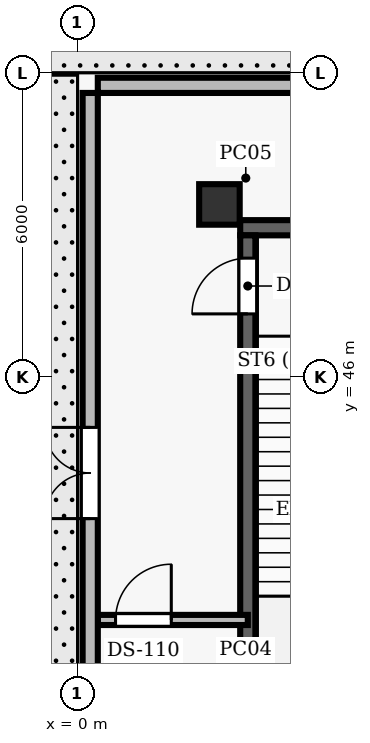
"""IFC4 building model, lengths in metres.
Left out: names, types, materials, properties, quantities, classifications, styles, units other than length and angle.
Written with IfcOpenShell. Run it as: python <this file> out.ifc"""

import sys

from ifc_helpers import new_model, si_unit, direction, frame, frame_2d, origin, origin_2d, place, context, subcontext, project, spatial, rectangle, extrude, element, fill, save


model = new_model("IFC4")
c1 = context("Model", 3, precision=1e-05, world=origin(), true_north=direction((0.0, 1.0)))
c2 = subcontext(c1, "Body", "Model", "MODEL_VIEW")
j1 = project(units=[si_unit("LENGTHUNIT", "METRE"), si_unit("PLANEANGLEUNIT", "RADIAN")], contexts=[c1])
p1 = place(None, origin())
s1 = spatial("IfcSite", under=j1, at=p1, CompositionType="ELEMENT")
p2 = place(p1, origin())
s2 = spatial("IfcBuilding", under=s1, at=p2, CompositionType="ELEMENT")
p3 = place(p2, origin())
s3 = spatial("IfcBuildingStorey", under=s2, at=p3, CompositionType="ELEMENT", Elevation=0.0)
p4 = place(p3, frame((2.8, 49.4, 0.0), z_axis=(0.0, 0.0, 1.0), x_axis=(1.0, 0.0, 0.0)))
e1 = element("IfcColumn", 1, at=p4, inside=s3, PredefinedType="COLUMN", context=c2, shape_type="SweptSolid", body=[
    extrude(rectangle(XDim=0.8, YDim=0.8, at=origin_2d()), origin(), (0.0, 0.0, 1.0), 6.6),
])
p5 = place(p3, frame((3.21, 48.94, 0.0), z_axis=(0.0, 0.0, 1.0), x_axis=(1.0, 0.0, 0.0)))
e2 = element("IfcWall", 2, at=p5, inside=s3, PredefinedType="SHEAR", context=c2, shape_type="SweptSolid", body=[
    extrude(rectangle(XDim=4.56, YDim=0.3, at=frame_2d((2.28, 0.0))), origin(), (0.0, 0.0, 1.0), 6.6),
])
p6 = place(p3, frame((3.36, 39.66, 0.0), z_axis=(0.0, 0.0, 1.0), x_axis=(0.0, 1.0, 0.0)))
e3 = element("IfcWall", 3, at=p6, inside=s3, PredefinedType="SHEAR", context=c2, shape_type="SweptSolid", body=[
    extrude(rectangle(XDim=9.13, YDim=0.3, at=frame_2d((4.565, 0.0))), origin(), (0.0, 0.0, 1.0), 6.6),
])
p7 = place(p6, frame((7.58, 0.0, 0.0)))
e4 = element("IfcOpeningElement", 4, at=p7, cuts=e3, PredefinedType="OPENING", context=c2, shape_type="SweptSolid", body=[
    extrude(rectangle(XDim=1.1, YDim=2.15, at=frame_2d((0.55, 1.075))), frame((0.0, 0.16, 0.0), z_axis=(0.0, -1.0, 0.0), x_axis=(1.0, 0.0, 0.0)), (0.0, 0.0, 1.0), 0.32),
])
p8 = place(p3, frame((0.4, 41.2, 0.0), z_axis=(0.0, 0.0, 1.0), x_axis=(1.0, 0.0, 0.0)))
e5 = element("IfcWall", 5, at=p8, inside=s3, PredefinedType="PARTITIONING", context=c2, shape_type="SweptSolid", body=[
    extrude(rectangle(XDim=2.96, YDim=0.2, at=frame_2d((1.48, 0.0))), origin(), (0.0, 0.0, 1.0), 5.31),
])
p9 = place(p8, frame((0.35, 0.0, 0.0)))
e6 = element("IfcOpeningElement", 6, at=p9, cuts=e5, PredefinedType="OPENING", context=c2, shape_type="SweptSolid", body=[
    extrude(rectangle(XDim=1.1, YDim=2.15, at=frame_2d((0.55, 1.075))), frame((0.0, 0.11, 0.0), z_axis=(0.0, -1.0, 0.0), x_axis=(1.0, 0.0, 0.0)), (0.0, 0.0, 1.0), 0.22),
])
p10 = place(p3, frame((0.25, 0.4, 0.0), z_axis=(0.0, 0.0, 1.0), x_axis=(0.0, 1.0, 0.0)))
e7 = element("IfcWall", 7, at=p10, inside=s3, PredefinedType="SOLIDWALL", context=c2, shape_type="SweptSolid", body=[
    extrude(rectangle(XDim=51.2, YDim=0.3, at=frame_2d((25.6, 0.0))), origin(), (0.0, 0.0, 1.0), 5.76),
])
p11 = place(p10, frame((14.0, 0.0, 0.0)))
e8 = element("IfcOpeningElement", 8, at=p11, cuts=e7, PredefinedType="OPENING", context=c2, shape_type="SweptSolid", body=[
    extrude(rectangle(XDim=1.8, YDim=2.3, at=frame_2d((0.9, 1.15))), frame((0.0, 0.16, 0.0), z_axis=(0.0, -1.0, 0.0), x_axis=(1.0, 0.0, 0.0)), (0.0, 0.0, 1.0), 0.32),
])
p12 = place(p10, frame((19.6, 0.0, 0.0)))
e9 = element("IfcOpeningElement", 9, at=p12, cuts=e7, PredefinedType="OPENING", context=c2, shape_type="SweptSolid", body=[
    extrude(rectangle(XDim=1.8, YDim=2.3, at=frame_2d((0.9, 1.15))), frame((0.0, 0.16, 0.0), z_axis=(0.0, -1.0, 0.0), x_axis=(1.0, 0.0, 0.0)), (0.0, 0.0, 1.0), 0.32),
])
p13 = place(p10, frame((29.2, 0.0, 0.0)))
e10 = element("IfcOpeningElement", 10, at=p13, cuts=e7, PredefinedType="OPENING", context=c2, shape_type="SweptSolid", body=[
    extrude(rectangle(XDim=1.8, YDim=2.3, at=frame_2d((0.9, 1.15))), frame((0.0, 0.16, 0.0), z_axis=(0.0, -1.0, 0.0), x_axis=(1.0, 0.0, 0.0)), (0.0, 0.0, 1.0), 0.32),
])
p14 = place(p10, frame((35.2, 0.0, 0.0)))
e11 = element("IfcOpeningElement", 11, at=p14, cuts=e7, PredefinedType="OPENING", context=c2, shape_type="SweptSolid", body=[
    extrude(rectangle(XDim=1.8, YDim=2.3, at=frame_2d((0.9, 1.15))), frame((0.0, 0.16, 0.0), z_axis=(0.0, -1.0, 0.0), x_axis=(1.0, 0.0, 0.0)), (0.0, 0.0, 1.0), 0.32),
])
p15 = place(p10, frame((6.4, 0.0, 0.0)))
e12 = element("IfcOpeningElement", 12, at=p15, cuts=e7, PredefinedType="OPENING", context=c2, shape_type="SweptSolid", body=[
    extrude(rectangle(XDim=1.8, YDim=2.3, at=frame_2d((0.9, 1.15))), frame((0.0, 0.16, 0.0), z_axis=(0.0, -1.0, 0.0), x_axis=(1.0, 0.0, 0.0)), (0.0, 0.0, 1.0), 0.32),
])
p16 = place(p10, frame((42.8, 0.0, 0.0)))
e13 = element("IfcOpeningElement", 13, at=p16, cuts=e7, PredefinedType="OPENING", context=c2, shape_type="SweptSolid", body=[
    extrude(rectangle(XDim=1.8, YDim=2.3, at=frame_2d((0.9, 1.15))), frame((0.0, 0.16, 0.0), z_axis=(0.0, -1.0, 0.0), x_axis=(1.0, 0.0, 0.0)), (0.0, 0.0, 1.0), 0.32),
])
p17 = place(p3, frame((0.4, 51.75, 0.0), z_axis=(0.0, 0.0, 1.0), x_axis=(1.0, 0.0, 0.0)))
e14 = element("IfcWall", 14, at=p17, inside=s3, PredefinedType="SOLIDWALL", context=c2, shape_type="SweptSolid", body=[
    extrude(rectangle(XDim=75.2, YDim=0.3, at=frame_2d((37.6, 0.0))), origin(), (0.0, 0.0, 1.0), 5.76),
])
p18 = place(p17, frame((22.0, 0.0, 1.0)))
e15 = element("IfcOpeningElement", 15, at=p18, cuts=e14, PredefinedType="OPENING", context=c2, shape_type="SweptSolid", body=[
    extrude(rectangle(XDim=2.4, YDim=2.0, at=frame_2d((1.2, 1.0))), frame((0.0, 0.16, 0.0), z_axis=(0.0, -1.0, 0.0), x_axis=(1.0, 0.0, 0.0)), (0.0, 0.0, 1.0), 0.32),
])
p19 = place(p17, frame((42.0, 0.0, 1.0)))
e16 = element("IfcOpeningElement", 16, at=p19, cuts=e14, PredefinedType="OPENING", context=c2, shape_type="SweptSolid", body=[
    extrude(rectangle(XDim=2.4, YDim=2.0, at=frame_2d((1.2, 1.0))), frame((0.0, 0.16, 0.0), z_axis=(0.0, -1.0, 0.0), x_axis=(1.0, 0.0, 0.0)), (0.0, 0.0, 1.0), 0.32),
])
p20 = place(p17, frame((11.6, 0.0, 0.0)))
e17 = element("IfcOpeningElement", 17, at=p20, cuts=e14, PredefinedType="OPENING", context=c2, shape_type="SweptSolid", body=[
    extrude(rectangle(XDim=1.8, YDim=2.3, at=frame_2d((0.9, 1.15))), frame((0.0, 0.16, 0.0), z_axis=(0.0, -1.0, 0.0), x_axis=(1.0, 0.0, 0.0)), (0.0, 0.0, 1.0), 0.32),
])
p21 = place(p17, frame((16.6, 0.0, 0.0)))
e18 = element("IfcOpeningElement", 18, at=p21, cuts=e14, PredefinedType="OPENING", context=c2, shape_type="SweptSolid", body=[
    extrude(rectangle(XDim=1.8, YDim=2.3, at=frame_2d((0.9, 1.15))), frame((0.0, 0.16, 0.0), z_axis=(0.0, -1.0, 0.0), x_axis=(1.0, 0.0, 0.0)), (0.0, 0.0, 1.0), 0.32),
])
p22 = place(p17, frame((30.7, 0.0, 0.0)))
e19 = element("IfcOpeningElement", 19, at=p22, cuts=e14, PredefinedType="OPENING", context=c2, shape_type="SweptSolid", body=[
    extrude(rectangle(XDim=1.8, YDim=2.3, at=frame_2d((0.9, 1.15))), frame((0.0, 0.16, 0.0), z_axis=(0.0, -1.0, 0.0), x_axis=(1.0, 0.0, 0.0)), (0.0, 0.0, 1.0), 0.32),
])
p23 = place(p17, frame((34.8, 0.0, 0.0)))
e20 = element("IfcOpeningElement", 20, at=p23, cuts=e14, PredefinedType="OPENING", context=c2, shape_type="SweptSolid", body=[
    extrude(rectangle(XDim=1.8, YDim=2.3, at=frame_2d((0.9, 1.15))), frame((0.0, 0.16, 0.0), z_axis=(0.0, -1.0, 0.0), x_axis=(1.0, 0.0, 0.0)), (0.0, 0.0, 1.0), 0.32),
])
p24 = place(p17, frame((52.2, 0.0, 0.0)))
e21 = element("IfcOpeningElement", 21, at=p24, cuts=e14, PredefinedType="OPENING", context=c2, shape_type="SweptSolid", body=[
    extrude(rectangle(XDim=1.8, YDim=2.3, at=frame_2d((0.9, 1.15))), frame((0.0, 0.16, 0.0), z_axis=(0.0, -1.0, 0.0), x_axis=(1.0, 0.0, 0.0)), (0.0, 0.0, 1.0), 0.32),
])
p25 = place(p17, frame((64.6, 0.0, 0.0)))
e22 = element("IfcOpeningElement", 22, at=p25, cuts=e14, PredefinedType="OPENING", context=c2, shape_type="SweptSolid", body=[
    extrude(rectangle(XDim=6.6, YDim=3.2, at=frame_2d((3.3, 1.6))), frame((0.0, 0.16, 0.0), z_axis=(0.0, -1.0, 0.0), x_axis=(1.0, 0.0, 0.0)), (0.0, 0.0, 1.0), 0.32),
])
p26 = place(p7, origin())
e23 = element("IfcDoor", 23, at=p26, inside=s3, OperationType="SINGLE_SWING_LEFT", PredefinedType="DOOR", context=c2, shape_type="SweptSolid", body=[
    extrude(rectangle(XDim=1.1, YDim=2.15, at=frame_2d((0.55, 1.075))), frame((0.0, 0.025, 0.0), z_axis=(0.0, -1.0, 0.0), x_axis=(1.0, 0.0, 0.0)), (0.0, 0.0, 1.0), 0.05),
])
fill(e4, e23)
p27 = place(p9, origin())
e24 = element("IfcDoor", 24, at=p27, inside=s3, OperationType="SINGLE_SWING_RIGHT", PredefinedType="DOOR", context=c2, shape_type="SweptSolid", body=[
    extrude(rectangle(XDim=1.1, YDim=2.15, at=frame_2d((0.55, 1.075))), frame((0.0, 0.025, 0.0), z_axis=(0.0, -1.0, 0.0), x_axis=(1.0, 0.0, 0.0)), (0.0, 0.0, 1.0), 0.05),
])
fill(e6, e24)
p28 = place(p16, origin())
e25 = element("IfcDoor", 25, at=p28, inside=s3, OperationType="DOUBLE_DOOR_SINGLE_SWING", PredefinedType="DOOR", context=c2, shape_type="SweptSolid", body=[
    extrude(rectangle(XDim=1.8, YDim=2.3, at=frame_2d((0.9, 1.15))), frame((0.0, 0.025, 0.0), z_axis=(0.0, -1.0, 0.0), x_axis=(1.0, 0.0, 0.0)), (0.0, 0.0, 1.0), 0.05),
])
fill(e13, e25)
save(model, sys.argv[1])
